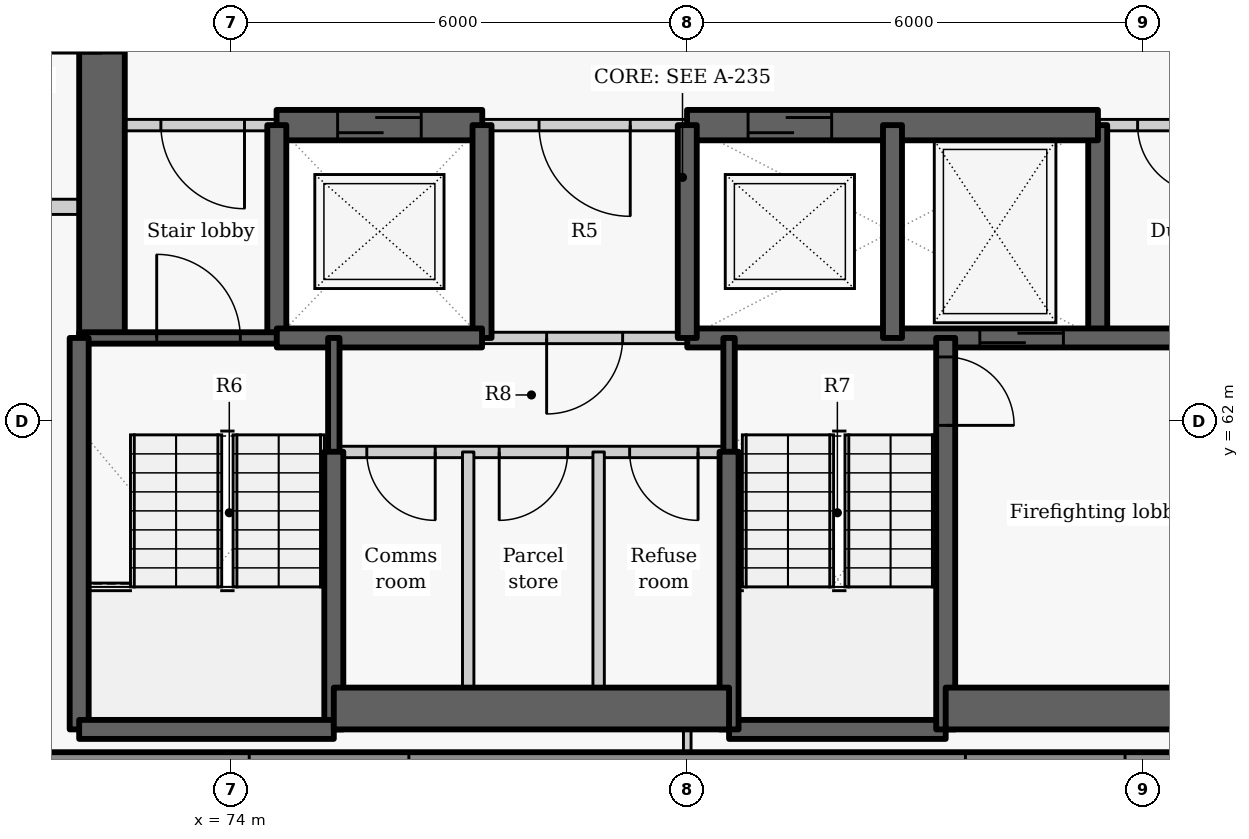
"""IFC4 building model, lengths in metres.
Left out: names, types, materials, properties, quantities, classifications, styles, units other than length and angle.
Written with IfcOpenShell. Run it as: python <this file> out.ifc"""

import sys

from ifc_helpers import new_model, si_unit, direction, frame, frame_2d, origin, place, context, subcontext, project, spatial, rectangle, extrude, element, fill, save


model = new_model("IFC4")
c1 = context("Model", 3, precision=1e-05, world=origin(), true_north=direction((0.0, 1.0)))
c2 = subcontext(c1, "Body", "Model", "MODEL_VIEW")
j1 = project(units=[si_unit("LENGTHUNIT", "METRE"), si_unit("PLANEANGLEUNIT", "RADIAN")], contexts=[c1])
p1 = place(None, origin())
s1 = spatial("IfcSite", under=j1, at=p1, CompositionType="ELEMENT")
p2 = place(p1, origin())
s2 = spatial("IfcBuilding", under=s1, at=p2, CompositionType="ELEMENT")
p3 = place(p2, frame((0.0, 0.0, 203.1)))
s3 = spatial("IfcBuildingStorey", under=s2, at=p3, CompositionType="ELEMENT", Elevation=203.1)
p4 = place(p3, frame((70.551, 57.5, 0.0), z_axis=(0.0, 0.0, 1.0), x_axis=(1.0, 0.0, 0.0)))
e1 = element("IfcWall", 1, at=p4, inside=s3, PredefinedType="SOLIDWALL", context=c2, shape_type="SweptSolid", body=[
    extrude(rectangle(XDim=18.893, YDim=0.3, at=frame_2d((9.446, 0.0))), origin(), (0.0, 0.0, 1.0), 2.425),
])
p5 = place(p4, frame((3.687, 0.0, 0.9)))
e2 = element("IfcOpeningElement", 2, at=p5, cuts=e1, PredefinedType="OPENING", context=c2, shape_type="SweptSolid", body=[
    extrude(rectangle(XDim=2.1, YDim=1.1, at=frame_2d((1.05, 0.55))), frame((0.0, 0.16, 0.0), z_axis=(0.0, -1.0, 0.0), x_axis=(1.0, 0.0, 0.0)), (0.0, 0.0, 1.0), 0.32),
])
p6 = place(p4, frame((13.109, 0.0, 0.9)))
e3 = element("IfcOpeningElement", 3, at=p6, cuts=e1, PredefinedType="OPENING", context=c2, shape_type="SweptSolid", body=[
    extrude(rectangle(XDim=2.1, YDim=1.1, at=frame_2d((1.05, 0.55))), frame((0.0, 0.16, 0.0), z_axis=(0.0, -1.0, 0.0), x_axis=(1.0, 0.0, 0.0)), (0.0, 0.0, 1.0), 0.32),
])
p7 = place(p3, frame((72.3, 63.1, -0.275), z_axis=(0.0, 0.0, 1.0), x_axis=(0.0, 1.0, 0.0)))
e4 = element("IfcWall", 4, at=p7, inside=s3, PredefinedType="SHEAR", context=c2, shape_type="SweptSolid", body=[
    extrude(rectangle(XDim=9.1, YDim=0.6, at=frame_2d((4.55, 0.0))), origin(), (0.0, 0.0, 1.0), 3.3),
])
p8 = place(p7, frame((3.748, 0.0, 0.275)))
e5 = element("IfcOpeningElement", 5, at=p8, cuts=e4, PredefinedType="OPENING", context=c2, shape_type="SweptSolid", body=[
    extrude(rectangle(XDim=1.5, YDim=2.1, at=frame_2d((0.75, 1.05))), frame((0.0, 0.31, 0.0), z_axis=(0.0, -1.0, 0.0), x_axis=(1.0, 0.0, 0.0)), (0.0, 0.0, 1.0), 0.62),
])
p9 = place(p3, frame((85.4, 63.1, -0.275), z_axis=(0.0, 0.0, 1.0), x_axis=(0.0, 1.0, 0.0)))
e6 = element("IfcWall", 6, at=p9, inside=s3, PredefinedType="SHEAR", context=c2, shape_type="SweptSolid", body=[
    extrude(rectangle(XDim=2.8, YDim=0.25, at=frame_2d((1.4, 0.0))), origin(), (0.0, 0.0, 1.0), 3.3),
])
p10 = place(p3, frame((74.603, 65.9, 0.0), z_axis=(0.0, 0.0, 1.0), x_axis=(-1.0, 0.0, 0.0)))
e7 = element("IfcWall", 7, at=p10, inside=s3, PredefinedType="PARTITIONING", context=c2, shape_type="SweptSolid", body=[
    extrude(rectangle(XDim=2.603, YDim=0.15, at=frame_2d((1.302, 0.0))), origin(), (0.0, 0.0, 1.0), 3.025),
])
p11 = place(p10, frame((0.428, 0.0, 0.0)))
e8 = element("IfcOpeningElement", 8, at=p11, cuts=e7, PredefinedType="OPENING", context=c2, shape_type="SweptSolid", body=[
    extrude(rectangle(XDim=1.1, YDim=2.1, at=frame_2d((0.55, 1.05))), frame((0.0, 0.085, 0.0), z_axis=(0.0, -1.0, 0.0), x_axis=(1.0, 0.0, 0.0)), (0.0, 0.0, 1.0), 0.17),
])
p12 = place(p3, frame((80.003, 65.9, 0.0), z_axis=(0.0, 0.0, 1.0), x_axis=(-1.0, 0.0, 0.0)))
e9 = element("IfcWall", 9, at=p12, inside=s3, PredefinedType="PARTITIONING", context=c2, shape_type="SweptSolid", body=[
    extrude(rectangle(XDim=2.706, YDim=0.15, at=frame_2d((1.353, 0.0))), origin(), (0.0, 0.0, 1.0), 3.025),
])
p13 = place(p12, frame((0.753, 0.0, 0.0)))
e10 = element("IfcOpeningElement", 10, at=p13, cuts=e9, PredefinedType="OPENING", context=c2, shape_type="SweptSolid", body=[
    extrude(rectangle(XDim=1.2, YDim=2.1, at=frame_2d((0.6, 1.05))), frame((0.0, 0.085, 0.0), z_axis=(0.0, -1.0, 0.0), x_axis=(1.0, 0.0, 0.0)), (0.0, 0.0, 1.0), 0.17),
])
p14 = place(p3, frame((88.0, 65.9, 0.0), z_axis=(0.0, 0.0, 1.0), x_axis=(-1.0, 0.0, 0.0)))
e11 = element("IfcWall", 11, at=p14, inside=s3, PredefinedType="PARTITIONING", context=c2, shape_type="SweptSolid", body=[
    extrude(rectangle(XDim=2.603, YDim=0.15, at=frame_2d((1.302, 0.0))), origin(), (0.0, 0.0, 1.0), 3.025),
])
p15 = place(p14, frame((1.175, 0.0, 0.0)))
e12 = element("IfcOpeningElement", 12, at=p15, cuts=e11, PredefinedType="OPENING", context=c2, shape_type="SweptSolid", body=[
    extrude(rectangle(XDim=0.9, YDim=2.1, at=frame_2d((0.45, 1.05))), frame((0.0, 0.085, 0.0), z_axis=(0.0, -1.0, 0.0), x_axis=(1.0, 0.0, 0.0)), (0.0, 0.0, 1.0), 0.17),
])
p16 = place(p3, frame((74.597, 65.9, -0.275), z_axis=(0.0, 0.0, 1.0), x_axis=(1.0, 0.0, 0.0)))
e13 = element("IfcWall", 13, at=p16, inside=s3, PredefinedType="SHEAR", context=c2, shape_type="SweptSolid", body=[
    extrude(rectangle(XDim=2.706, YDim=0.4, at=frame_2d((1.353, 0.0))), origin(), (0.0, 0.0, 1.0), 3.3),
])
p17 = place(p16, frame((0.803, 0.0, 0.275)))
e14 = element("IfcOpeningElement", 14, at=p17, cuts=e13, PredefinedType="OPENING", context=c2, shape_type="SweptSolid", body=[
    extrude(rectangle(XDim=1.1, YDim=2.1, at=frame_2d((0.55, 1.05))), frame((0.0, 0.21, 0.0), z_axis=(0.0, -1.0, 0.0), x_axis=(1.0, 0.0, 0.0)), (0.0, 0.0, 1.0), 0.42),
])
p18 = place(p3, frame((79.997, 65.9, -0.275), z_axis=(0.0, 0.0, 1.0), x_axis=(1.0, 0.0, 0.0)))
e15 = element("IfcWall", 15, at=p18, inside=s3, PredefinedType="SHEAR", context=c2, shape_type="SweptSolid", body=[
    extrude(rectangle(XDim=5.406, YDim=0.4, at=frame_2d((2.703, 0.0))), origin(), (0.0, 0.0, 1.0), 3.3),
])
p19 = place(p18, frame((0.803, 0.0, 0.275)))
e16 = element("IfcOpeningElement", 16, at=p19, cuts=e15, PredefinedType="OPENING", context=c2, shape_type="SweptSolid", body=[
    extrude(rectangle(XDim=1.1, YDim=2.1, at=frame_2d((0.55, 1.05))), frame((0.0, 0.21, 0.0), z_axis=(0.0, -1.0, 0.0), x_axis=(1.0, 0.0, 0.0)), (0.0, 0.0, 1.0), 0.42),
])
p20 = place(p3, frame((74.6, 63.1, -0.275), z_axis=(0.0, 0.0, 1.0), x_axis=(0.0, 1.0, 0.0)))
e17 = element("IfcWall", 17, at=p20, inside=s3, PredefinedType="SHEAR", context=c2, shape_type="SweptSolid", body=[
    extrude(rectangle(XDim=2.8, YDim=0.25, at=frame_2d((1.4, 0.0))), origin(), (0.0, 0.0, 1.0), 3.3),
])
p21 = place(p3, frame((72.0, 63.1, -0.275), z_axis=(0.0, 0.0, 1.0), x_axis=(1.0, 0.0, 0.0)))
e18 = element("IfcWall", 18, at=p21, inside=s3, PredefinedType="SHEAR", context=c2, shape_type="SweptSolid", body=[
    extrude(rectangle(XDim=2.6, YDim=0.15, at=frame_2d((1.3, 0.0))), origin(), (0.0, 0.0, 1.0), 3.3),
])
p22 = place(p21, frame((1.02, 0.0, 0.275)))
e19 = element("IfcOpeningElement", 19, at=p22, cuts=e18, PredefinedType="OPENING", context=c2, shape_type="SweptSolid", body=[
    extrude(rectangle(XDim=1.1, YDim=2.1, at=frame_2d((0.55, 1.05))), frame((0.0, 0.085, 0.0), z_axis=(0.0, -1.0, 0.0), x_axis=(1.0, 0.0, 0.0)), (0.0, 0.0, 1.0), 0.17),
])
p23 = place(p3, frame((77.3, 63.1, -0.275), z_axis=(0.0, 0.0, 1.0), x_axis=(0.0, 1.0, 0.0)))
e20 = element("IfcWall", 20, at=p23, inside=s3, PredefinedType="SHEAR", context=c2, shape_type="SweptSolid", body=[
    extrude(rectangle(XDim=2.8, YDim=0.25, at=frame_2d((1.4, 0.0))), origin(), (0.0, 0.0, 1.0), 3.3),
])
p24 = place(p3, frame((74.6, 63.1, -0.275), z_axis=(0.0, 0.0, 1.0), x_axis=(1.0, 0.0, 0.0)))
e21 = element("IfcWall", 21, at=p24, inside=s3, PredefinedType="SHEAR", context=c2, shape_type="SweptSolid", body=[
    extrude(rectangle(XDim=2.7, YDim=0.25, at=frame_2d((1.35, 0.0))), origin(), (0.0, 0.0, 1.0), 3.3),
])
p25 = place(p3, frame((80.0, 63.1, -0.275), z_axis=(0.0, 0.0, 1.0), x_axis=(1.0, 0.0, 0.0)))
e22 = element("IfcWall", 22, at=p25, inside=s3, PredefinedType="SHEAR", context=c2, shape_type="SweptSolid", body=[
    extrude(rectangle(XDim=8.0, YDim=0.25, at=frame_2d((4.0, 0.0))), origin(), (0.0, 0.0, 1.0), 3.3),
])
p26 = place(p25, frame((3.849, 0.0, 0.275)))
e23 = element("IfcOpeningElement", 23, at=p26, cuts=e22, PredefinedType="OPENING", context=c2, shape_type="SweptSolid", body=[
    extrude(rectangle(XDim=1.1, YDim=2.1, at=frame_2d((0.55, 1.05))), frame((0.0, 0.135, 0.0), z_axis=(0.0, -1.0, 0.0), x_axis=(1.0, 0.0, 0.0)), (0.0, 0.0, 1.0), 0.27),
])
p27 = place(p3, frame((80.0, 63.1, -0.275), z_axis=(0.0, 0.0, 1.0), x_axis=(0.0, 1.0, 0.0)))
e24 = element("IfcWall", 24, at=p27, inside=s3, PredefinedType="SHEAR", context=c2, shape_type="SweptSolid", body=[
    extrude(rectangle(XDim=2.8, YDim=0.25, at=frame_2d((1.4, 0.0))), origin(), (0.0, 0.0, 1.0), 3.3),
])
p28 = place(p3, frame((80.0, 63.1, 0.0), z_axis=(0.0, 0.0, 1.0), x_axis=(-1.0, 0.0, 0.0)))
e25 = element("IfcWall", 25, at=p28, inside=s3, PredefinedType="PARTITIONING", context=c2, shape_type="SweptSolid", body=[
    extrude(rectangle(XDim=2.7, YDim=0.15, at=frame_2d((1.35, 0.0))), origin(), (0.0, 0.0, 1.0), 3.025),
])
p29 = place(p28, frame((0.85, 0.0, 0.0)))
e26 = element("IfcOpeningElement", 26, at=p29, cuts=e25, PredefinedType="OPENING", context=c2, shape_type="SweptSolid", body=[
    extrude(rectangle(XDim=1.0, YDim=2.1, at=frame_2d((0.5, 1.05))), frame((0.0, 0.085, 0.0), z_axis=(0.0, -1.0, 0.0), x_axis=(1.0, 0.0, 0.0)), (0.0, 0.0, 1.0), 0.17),
])
p30 = place(p3, frame((82.7, 63.1, -0.275), z_axis=(0.0, 0.0, 1.0), x_axis=(0.0, 1.0, 0.0)))
e27 = element("IfcWall", 27, at=p30, inside=s3, PredefinedType="SHEAR", context=c2, shape_type="SweptSolid", body=[
    extrude(rectangle(XDim=2.8, YDim=0.25, at=frame_2d((1.4, 0.0))), origin(), (0.0, 0.0, 1.0), 3.3),
])
p31 = place(p3, frame((75.35, 61.597, -0.275), z_axis=(0.0, 0.0, 1.0), x_axis=(0.0, 1.0, 0.0)))
e28 = element("IfcWall", 28, at=p31, inside=s3, PredefinedType="SHEAR", context=c2, shape_type="SweptSolid", body=[
    extrude(rectangle(XDim=1.503, YDim=0.15, at=frame_2d((0.751, 0.0))), origin(), (0.0, 0.0, 1.0), 3.3),
])
p32 = place(p3, frame((75.35, 57.95, -0.275), z_axis=(0.0, 0.0, 1.0), x_axis=(0.0, 1.0, 0.0)))
e29 = element("IfcWall", 29, at=p32, inside=s3, PredefinedType="SHEAR", context=c2, shape_type="SweptSolid", body=[
    extrude(rectangle(XDim=3.653, YDim=0.25, at=frame_2d((1.827, 0.0))), origin(), (0.0, 0.0, 1.0), 3.3),
])
p33 = place(p3, frame((72.0, 57.95, -0.275), z_axis=(0.0, 0.0, 1.0), x_axis=(0.0, 1.0, 0.0)))
e30 = element("IfcWall", 30, at=p33, inside=s3, PredefinedType="SHEAR", context=c2, shape_type="SweptSolid", body=[
    extrude(rectangle(XDim=5.15, YDim=0.25, at=frame_2d((2.575, 0.0))), origin(), (0.0, 0.0, 1.0), 3.3),
])
p34 = place(p3, frame((72.0, 57.95, -0.275), z_axis=(0.0, 0.0, 1.0), x_axis=(1.0, 0.0, 0.0)))
e31 = element("IfcWall", 31, at=p34, inside=s3, PredefinedType="SHEAR", context=c2, shape_type="SweptSolid", body=[
    extrude(rectangle(XDim=3.35, YDim=0.25, at=frame_2d((1.675, 0.0))), origin(), (0.0, 0.0, 1.0), 3.3),
])
p35 = place(p3, frame((80.55, 57.95, -0.275), z_axis=(0.0, 0.0, 1.0), x_axis=(1.0, 0.0, 0.0)))
e32 = element("IfcWall", 32, at=p35, inside=s3, PredefinedType="SHEAR", context=c2, shape_type="SweptSolid", body=[
    extrude(rectangle(XDim=2.85, YDim=0.25, at=frame_2d((1.425, 0.0))), origin(), (0.0, 0.0, 1.0), 3.3),
])
p36 = place(p3, frame((83.4, 63.1, -0.275), z_axis=(0.0, 0.0, 1.0), x_axis=(0.0, -1.0, 0.0)))
e33 = element("IfcWall", 33, at=p36, inside=s3, PredefinedType="SHEAR", context=c2, shape_type="SweptSolid", body=[
    extrude(rectangle(XDim=5.15, YDim=0.25, at=frame_2d((2.575, 0.0))), origin(), (0.0, 0.0, 1.0), 3.3),
])
p37 = place(p36, frame((0.25, 0.0, 0.275)))
e34 = element("IfcOpeningElement", 34, at=p37, cuts=e33, PredefinedType="OPENING", context=c2, shape_type="SweptSolid", body=[
    extrude(rectangle(XDim=0.9, YDim=2.1, at=frame_2d((0.45, 1.05))), frame((0.0, 0.135, 0.0), z_axis=(0.0, -1.0, 0.0), x_axis=(1.0, 0.0, 0.0)), (0.0, 0.0, 1.0), 0.27),
])
p38 = place(p3, frame((80.55, 61.597, -0.275), z_axis=(0.0, 0.0, 1.0), x_axis=(0.0, 1.0, 0.0)))
e35 = element("IfcWall", 35, at=p38, inside=s3, PredefinedType="SHEAR", context=c2, shape_type="SweptSolid", body=[
    extrude(rectangle(XDim=1.503, YDim=0.15, at=frame_2d((0.751, 0.0))), origin(), (0.0, 0.0, 1.0), 3.3),
])
p39 = place(p3, frame((80.55, 57.95, -0.275), z_axis=(0.0, 0.0, 1.0), x_axis=(0.0, 1.0, 0.0)))
e36 = element("IfcWall", 36, at=p39, inside=s3, PredefinedType="SHEAR", context=c2, shape_type="SweptSolid", body=[
    extrude(rectangle(XDim=3.653, YDim=0.25, at=frame_2d((1.827, 0.0))), origin(), (0.0, 0.0, 1.0), 3.3),
])
p40 = place(p3, frame((75.35, 58.225, -0.275), z_axis=(0.0, 0.0, 1.0), x_axis=(1.0, 0.0, 0.0)))
e37 = element("IfcWall", 37, at=p40, inside=s3, PredefinedType="SHEAR", context=c2, shape_type="SweptSolid", body=[
    extrude(rectangle(XDim=5.2, YDim=0.55, at=frame_2d((2.6, 0.0))), origin(), (0.0, 0.0, 1.0), 3.3),
])
p41 = place(p3, frame((83.4, 58.225, -0.275), z_axis=(0.0, 0.0, 1.0), x_axis=(1.0, 0.0, 0.0)))
e38 = element("IfcWall", 38, at=p41, inside=s3, PredefinedType="SHEAR", context=c2, shape_type="SweptSolid", body=[
    extrude(rectangle(XDim=4.6, YDim=0.55, at=frame_2d((2.3, 0.0))), origin(), (0.0, 0.0, 1.0), 3.3),
])
p42 = place(p3, frame((80.55, 61.6, 0.0), z_axis=(0.0, 0.0, 1.0), x_axis=(-1.0, 0.0, 0.0)))
e39 = element("IfcWall", 39, at=p42, inside=s3, PredefinedType="PARTITIONING", context=c2, shape_type="SweptSolid", body=[
    extrude(rectangle(XDim=5.2, YDim=0.15, at=frame_2d((2.6, 0.0))), origin(), (0.0, 0.0, 1.0), 3.025),
])
p43 = place(p42, frame((3.866, 0.0, 0.0)))
e40 = element("IfcOpeningElement", 40, at=p43, cuts=e39, PredefinedType="OPENING", context=c2, shape_type="SweptSolid", body=[
    extrude(rectangle(XDim=0.9, YDim=2.1, at=frame_2d((0.45, 1.05))), frame((0.0, 0.085, 0.0), z_axis=(0.0, -1.0, 0.0), x_axis=(1.0, 0.0, 0.0)), (0.0, 0.0, 1.0), 0.17),
])
p44 = place(p42, frame((2.124, 0.0, 0.0)))
e41 = element("IfcOpeningElement", 41, at=p44, cuts=e39, PredefinedType="OPENING", context=c2, shape_type="SweptSolid", body=[
    extrude(rectangle(XDim=0.9, YDim=2.1, at=frame_2d((0.45, 1.05))), frame((0.0, 0.085, 0.0), z_axis=(0.0, -1.0, 0.0), x_axis=(1.0, 0.0, 0.0)), (0.0, 0.0, 1.0), 0.17),
])
p45 = place(p42, frame((0.408, 0.0, 0.0)))
e42 = element("IfcOpeningElement", 42, at=p45, cuts=e39, PredefinedType="OPENING", context=c2, shape_type="SweptSolid", body=[
    extrude(rectangle(XDim=0.9, YDim=2.1, at=frame_2d((0.45, 1.05))), frame((0.0, 0.085, 0.0), z_axis=(0.0, -1.0, 0.0), x_axis=(1.0, 0.0, 0.0)), (0.0, 0.0, 1.0), 0.17),
])
for number, where, z_axis, x_axis in (
    (43, (77.118, 57.95, 0.0), (0.0, 0.0, 1.0), (0.0, 1.0, 0.0)),
    (44, (78.834, 57.95, 0.0), (0.0, 0.0, 1.0), (0.0, 1.0, 0.0)),
):
    element("IfcWall", number, at=place(p3, frame(where, z_axis=z_axis, x_axis=x_axis)), inside=s3, PredefinedType="PARTITIONING", context=c2, shape_type="SweptSolid", body=[
        extrude(rectangle(XDim=3.65, YDim=0.15, at=frame_2d((1.825, 0.0))), origin(), (0.0, 0.0, 1.0), 3.025),
    ])
p46 = place(p3, frame((70.527, 64.825, 0.0), z_axis=(0.0, 0.0, 1.0), x_axis=(1.0, 0.0, 0.0)))
e45 = element("IfcWall", 45, at=p46, inside=s3, PredefinedType="PARTITIONING", context=c2, shape_type="SweptSolid", body=[
    extrude(rectangle(XDim=1.473, YDim=0.2, at=frame_2d((0.736, 0.0))), origin(), (0.0, 0.0, 1.0), 3.025),
])
p47 = place(p3, frame((80.0, 57.65, 0.0), z_axis=(0.0, 0.0, 1.0), x_axis=(0.0, 1.0, 0.0)))
e46 = element("IfcWall", 46, at=p47, inside=s3, PredefinedType="PARTITIONING", context=c2, shape_type="SweptSolid", body=[
    extrude(rectangle(XDim=0.3, YDim=0.1, at=frame_2d((0.15, 0.0))), origin(), (0.0, 0.0, 1.0), 3.025),
])
p48 = place(p11, origin())
e47 = element("IfcDoor", 47, at=p48, inside=s3, OperationType="SINGLE_SWING_LEFT", PredefinedType="DOOR", context=c2, shape_type="SweptSolid", body=[
    extrude(rectangle(XDim=1.1, YDim=2.1, at=frame_2d((0.55, 1.05))), frame((0.0, 0.025, 0.0), z_axis=(0.0, -1.0, 0.0), x_axis=(1.0, 0.0, 0.0)), (0.0, 0.0, 1.0), 0.05),
])
fill(e8, e47)
p49 = place(p17, origin())
e48 = element("IfcDoor", 48, at=p49, inside=s3, OperationType="SLIDING_TO_LEFT", PredefinedType="DOOR", context=c2, shape_type="SweptSolid", body=[
    extrude(rectangle(XDim=1.1, YDim=2.1, at=frame_2d((0.55, 1.05))), frame((0.0, 0.025, 0.0), z_axis=(0.0, -1.0, 0.0), x_axis=(1.0, 0.0, 0.0)), (0.0, 0.0, 1.0), 0.05),
])
fill(e14, e48)
p50 = place(p13, origin())
e49 = element("IfcDoor", 49, at=p50, inside=s3, OperationType="DOUBLE_DOOR_SINGLE_SWING", PredefinedType="DOOR", context=c2, shape_type="SweptSolid", body=[
    extrude(rectangle(XDim=1.2, YDim=2.1, at=frame_2d((0.6, 1.05))), frame((0.0, 0.025, 0.0), z_axis=(0.0, -1.0, 0.0), x_axis=(1.0, 0.0, 0.0)), (0.0, 0.0, 1.0), 0.05),
])
fill(e10, e49)
p51 = place(p19, origin())
e50 = element("IfcDoor", 50, at=p51, inside=s3, OperationType="SLIDING_TO_LEFT", PredefinedType="DOOR", context=c2, shape_type="SweptSolid", body=[
    extrude(rectangle(XDim=1.1, YDim=2.1, at=frame_2d((0.55, 1.05))), frame((0.0, 0.025, 0.0), z_axis=(0.0, -1.0, 0.0), x_axis=(1.0, 0.0, 0.0)), (0.0, 0.0, 1.0), 0.05),
])
fill(e16, e50)
p52 = place(p26, origin())
e51 = element("IfcDoor", 51, at=p52, inside=s3, OperationType="SLIDING_TO_LEFT", PredefinedType="DOOR", context=c2, shape_type="SweptSolid", body=[
    extrude(rectangle(XDim=1.1, YDim=2.1, at=frame_2d((0.55, 1.05))), frame((0.0, 0.025, 0.0), z_axis=(0.0, -1.0, 0.0), x_axis=(1.0, 0.0, 0.0)), (0.0, 0.0, 1.0), 0.05),
])
fill(e23, e51)
p53 = place(p15, origin())
e52 = element("IfcDoor", 52, at=p53, inside=s3, OperationType="SINGLE_SWING_LEFT", PredefinedType="DOOR", context=c2, shape_type="SweptSolid", body=[
    extrude(rectangle(XDim=0.9, YDim=2.1, at=frame_2d((0.45, 1.05))), frame((0.0, 0.025, 0.0), z_axis=(0.0, -1.0, 0.0), x_axis=(1.0, 0.0, 0.0)), (0.0, 0.0, 1.0), 0.05),
])
fill(e12, e52)
p54 = place(p29, origin())
e53 = element("IfcDoor", 53, at=p54, inside=s3, OperationType="SINGLE_SWING_RIGHT", PredefinedType="DOOR", context=c2, shape_type="SweptSolid", body=[
    extrude(rectangle(XDim=1.0, YDim=2.1, at=frame_2d((0.5, 1.05))), frame((0.0, 0.025, 0.0), z_axis=(0.0, -1.0, 0.0), x_axis=(1.0, 0.0, 0.0)), (0.0, 0.0, 1.0), 0.05),
])
fill(e26, e53)
p55 = place(p43, origin())
e54 = element("IfcDoor", 54, at=p55, inside=s3, OperationType="SINGLE_SWING_LEFT", PredefinedType="DOOR", context=c2, shape_type="SweptSolid", body=[
    extrude(rectangle(XDim=0.9, YDim=2.1, at=frame_2d((0.45, 1.05))), frame((0.0, 0.025, 0.0), z_axis=(0.0, -1.0, 0.0), x_axis=(1.0, 0.0, 0.0)), (0.0, 0.0, 1.0), 0.05),
])
fill(e40, e54)
p56 = place(p44, origin())
e55 = element("IfcDoor", 55, at=p56, inside=s3, OperationType="SINGLE_SWING_RIGHT", PredefinedType="DOOR", context=c2, shape_type="SweptSolid", body=[
    extrude(rectangle(XDim=0.9, YDim=2.1, at=frame_2d((0.45, 1.05))), frame((0.0, 0.025, 0.0), z_axis=(0.0, -1.0, 0.0), x_axis=(1.0, 0.0, 0.0)), (0.0, 0.0, 1.0), 0.05),
])
fill(e41, e55)
p57 = place(p45, origin())
e56 = element("IfcDoor", 56, at=p57, inside=s3, OperationType="SINGLE_SWING_LEFT", PredefinedType="DOOR", context=c2, shape_type="SweptSolid", body=[
    extrude(rectangle(XDim=0.9, YDim=2.1, at=frame_2d((0.45, 1.05))), frame((0.0, 0.025, 0.0), z_axis=(0.0, -1.0, 0.0), x_axis=(1.0, 0.0, 0.0)), (0.0, 0.0, 1.0), 0.05),
])
fill(e42, e56)
p58 = place(p22, origin())
e57 = element("IfcDoor", 57, at=p58, inside=s3, OperationType="SINGLE_SWING_LEFT", PredefinedType="DOOR", context=c2, shape_type="SweptSolid", body=[
    extrude(rectangle(XDim=1.1, YDim=2.1, at=frame_2d((0.55, 1.05))), frame((0.0, 0.025, 0.0), z_axis=(0.0, -1.0, 0.0), x_axis=(1.0, 0.0, 0.0)), (0.0, 0.0, 1.0), 0.05),
])
fill(e19, e57)
p59 = place(p37, origin())
e58 = element("IfcDoor", 58, at=p59, inside=s3, OperationType="SINGLE_SWING_RIGHT", PredefinedType="DOOR", context=c2, shape_type="SweptSolid", body=[
    extrude(rectangle(XDim=0.9, YDim=2.1, at=frame_2d((0.45, 1.05))), frame((0.0, 0.025, 0.0), z_axis=(0.0, -1.0, 0.0), x_axis=(1.0, 0.0, 0.0)), (0.0, 0.0, 1.0), 0.05),
])
fill(e34, e58)
p60 = place(p8, origin())
e59 = element("IfcDoor", 59, at=p60, inside=s3, OperationType="DOUBLE_DOOR_SINGLE_SWING", PredefinedType="DOOR", context=c2, shape_type="SweptSolid", body=[
    extrude(rectangle(XDim=1.5, YDim=2.1, at=frame_2d((0.75, 1.05))), frame((0.0, 0.025, 0.0), z_axis=(0.0, -1.0, 0.0), x_axis=(1.0, 0.0, 0.0)), (0.0, 0.0, 1.0), 0.05),
])
fill(e5, e59)
save(model, sys.argv[1])
